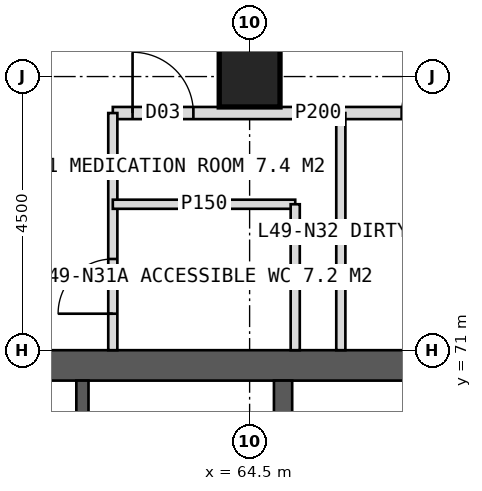
"""IFC4 building model, lengths in metres.
Left out: names, types, materials, properties, quantities, classifications, styles, units other than length and angle.
Written with IfcOpenShell. Run it as: python <this file> out.ifc"""

import sys

from ifc_helpers import new_model, si_unit, direction, frame, frame_2d, origin, origin_2d, place, context, subcontext, project, spatial, rectangle, hollow_rectangle, extrude, element, fill, save


model = new_model("IFC4")
c1 = context("Model", 3, precision=1e-05, world=origin(), true_north=direction((0.0, 1.0)))
c2 = subcontext(c1, "Body", "Model", "MODEL_VIEW")
j1 = project(units=[si_unit("LENGTHUNIT", "METRE"), si_unit("PLANEANGLEUNIT", "RADIAN")], contexts=[c1])
p1 = place(None, origin())
s1 = spatial("IfcSite", under=j1, at=p1, CompositionType="ELEMENT")
p2 = place(p1, origin())
s2 = spatial("IfcBuilding", under=s1, at=p2, CompositionType="ELEMENT")
p3 = place(p2, frame((0.0, 0.0, 205.0)))
s3 = spatial("IfcBuildingStorey", under=s2, at=p3, CompositionType="ELEMENT", Elevation=205.0)
p4 = place(p3, frame((51.0, 70.75, 0.0), z_axis=(0.0, 0.0, 1.0), x_axis=(1.0, 0.0, 0.0)))
e1 = element("IfcWall", 1, at=p4, inside=s3, PredefinedType="SHEAR", context=c2, shape_type="SweptSolid", body=[
    extrude(rectangle(XDim=18.0, YDim=0.5, at=frame_2d((9.0, 0.0))), origin(), (0.0, 0.0, 1.0), 4.0),
])
p5 = place(p4, frame((8.1, 0.0, 0.0)))
e2 = element("IfcOpeningElement", 2, at=p5, cuts=e1, PredefinedType="OPENING", context=c2, shape_type="SweptSolid", body=[
    extrude(rectangle(XDim=1.8, YDim=2.2, at=frame_2d((0.9, 1.1))), frame((0.0, 0.26, 0.0), z_axis=(0.0, -1.0, 0.0), x_axis=(1.0, 0.0, 0.0)), (0.0, 0.0, 1.0), 0.52),
])
p6 = place(p3, frame((65.05, 53.5, 0.0), z_axis=(0.0, 0.0, 1.0), x_axis=(0.0, 1.0, 0.0)))
e3 = element("IfcWall", 3, at=p6, inside=s3, PredefinedType="SHEAR", context=c2, shape_type="SweptSolid", body=[
    extrude(rectangle(XDim=17.0, YDim=0.3, at=frame_2d((8.5, 0.0))), origin(), (0.0, 0.0, 1.0), 4.0),
])
p7 = place(p3, frame((61.75, 53.5, 0.0), z_axis=(0.0, 0.0, 1.0), x_axis=(0.0, 1.0, 0.0)))
e4 = element("IfcWall", 4, at=p7, inside=s3, PredefinedType="SHEAR", context=c2, shape_type="SweptSolid", body=[
    extrude(rectangle(XDim=17.0, YDim=0.2, at=frame_2d((8.5, 0.0))), origin(), (0.0, 0.0, 1.0), 4.0),
])
p8 = place(p7, frame((0.496, 0.0, 0.0)))
e5 = element("IfcOpeningElement", 5, at=p8, cuts=e4, PredefinedType="OPENING", context=c2, shape_type="SweptSolid", body=[
    extrude(rectangle(XDim=1.0, YDim=2.1, at=frame_2d((0.5, 1.05))), frame((0.0, 0.11, 0.0), z_axis=(0.0, -1.0, 0.0), x_axis=(1.0, 0.0, 0.0)), (0.0, 0.0, 1.0), 0.22),
])
p9 = place(p7, frame((2.646, 0.0, 0.0)))
e6 = element("IfcOpeningElement", 6, at=p9, cuts=e4, PredefinedType="OPENING", context=c2, shape_type="SweptSolid", body=[
    extrude(rectangle(XDim=1.0, YDim=2.1, at=frame_2d((0.5, 1.05))), frame((0.0, 0.11, 0.0), z_axis=(0.0, -1.0, 0.0), x_axis=(1.0, 0.0, 0.0)), (0.0, 0.0, 1.0), 0.22),
])
p10 = place(p7, frame((5.027, 0.0, 0.0)))
e7 = element("IfcOpeningElement", 7, at=p10, cuts=e4, PredefinedType="OPENING", context=c2, shape_type="SweptSolid", body=[
    extrude(rectangle(XDim=1.0, YDim=2.1, at=frame_2d((0.5, 1.05))), frame((0.0, 0.11, 0.0), z_axis=(0.0, -1.0, 0.0), x_axis=(1.0, 0.0, 0.0)), (0.0, 0.0, 1.0), 0.22),
])
p11 = place(p7, frame((7.126, 0.0, 0.0)))
e8 = element("IfcOpeningElement", 8, at=p11, cuts=e4, PredefinedType="OPENING", context=c2, shape_type="SweptSolid", body=[
    extrude(rectangle(XDim=1.0, YDim=2.1, at=frame_2d((0.5, 1.05))), frame((0.0, 0.11, 0.0), z_axis=(0.0, -1.0, 0.0), x_axis=(1.0, 0.0, 0.0)), (0.0, 0.0, 1.0), 0.22),
])
p12 = place(p7, frame((10.025, 0.0, 0.0)))
e9 = element("IfcOpeningElement", 9, at=p12, cuts=e4, PredefinedType="OPENING", context=c2, shape_type="SweptSolid", body=[
    extrude(rectangle(XDim=1.4, YDim=2.2, at=frame_2d((0.7, 1.1))), frame((0.0, 0.11, 0.0), z_axis=(0.0, -1.0, 0.0), x_axis=(1.0, 0.0, 0.0)), (0.0, 0.0, 1.0), 0.22),
])
p13 = place(p7, frame((14.325, 0.0, 0.0)))
e10 = element("IfcOpeningElement", 10, at=p13, cuts=e4, PredefinedType="OPENING", context=c2, shape_type="SweptSolid", body=[
    extrude(rectangle(XDim=1.4, YDim=2.2, at=frame_2d((0.7, 1.1))), frame((0.0, 0.11, 0.0), z_axis=(0.0, -1.0, 0.0), x_axis=(1.0, 0.0, 0.0)), (0.0, 0.0, 1.0), 0.22),
])
p14 = place(p3, frame((64.5, 75.5, 0.0), z_axis=(0.0, 0.0, 1.0), x_axis=(1.0, 0.0, 0.0)))
e11 = element("IfcColumn", 11, at=p14, inside=s3, PredefinedType="COLUMN", context=c2, shape_type="SweptSolid", body=[
    extrude(hollow_rectangle(XDim=1.0, YDim=1.0, WallThickness=0.1, at=origin_2d()), origin(), (0.0, 0.0, 1.0), 4.0),
])
p15 = place(p3, frame((62.25, 74.9, 0.0), z_axis=(0.0, 0.0, 1.0), x_axis=(1.0, 0.0, 0.0)))
e12 = element("IfcWall", 12, at=p15, inside=s3, PredefinedType="PARTITIONING", context=c2, shape_type="SweptSolid", body=[
    extrude(rectangle(XDim=6.75, YDim=0.2, at=frame_2d((3.375, 0.0))), origin(), (0.0, 0.0, 1.0), 3.75),
])
p16 = place(p15, frame((0.325, 0.0, 0.0)))
e13 = element("IfcOpeningElement", 13, at=p16, cuts=e12, PredefinedType="OPENING", context=c2, shape_type="SweptSolid", body=[
    extrude(rectangle(XDim=1.0, YDim=2.1, at=frame_2d((0.5, 1.05))), frame((0.0, 0.11, 0.0), z_axis=(0.0, -1.0, 0.0), x_axis=(1.0, 0.0, 0.0)), (0.0, 0.0, 1.0), 0.22),
])
p17 = place(p15, frame((4.75, 0.0, 0.0)))
e14 = element("IfcOpeningElement", 14, at=p17, cuts=e12, PredefinedType="OPENING", context=c2, shape_type="SweptSolid", body=[
    extrude(rectangle(XDim=1.0, YDim=2.1, at=frame_2d((0.5, 1.05))), frame((0.0, 0.11, 0.0), z_axis=(0.0, -1.0, 0.0), x_axis=(1.0, 0.0, 0.0)), (0.0, 0.0, 1.0), 0.22),
])
p18 = place(p3, frame((62.25, 71.0, 0.0), z_axis=(0.0, 0.0, 1.0), x_axis=(0.0, 1.0, 0.0)))
e15 = element("IfcWall", 15, at=p18, inside=s3, PredefinedType="PARTITIONING", context=c2, shape_type="SweptSolid", body=[
    extrude(rectangle(XDim=3.9, YDim=0.15, at=frame_2d((1.95, 0.0))), origin(), (0.0, 0.0, 1.0), 3.75),
])
p19 = place(p18, frame((0.6, 0.0, 0.0)))
e16 = element("IfcOpeningElement", 16, at=p19, cuts=e15, PredefinedType="OPENING", context=c2, shape_type="SweptSolid", body=[
    extrude(rectangle(XDim=0.9, YDim=2.1, at=frame_2d((0.45, 1.05))), frame((0.0, 0.085, 0.0), z_axis=(0.0, -1.0, 0.0), x_axis=(1.0, 0.0, 0.0)), (0.0, 0.0, 1.0), 0.17),
])
p20 = place(p3, frame((66.0, 71.0, 0.0), z_axis=(0.0, 0.0, 1.0), x_axis=(0.0, 1.0, 0.0)))
e17 = element("IfcWall", 17, at=p20, inside=s3, PredefinedType="PARTITIONING", context=c2, shape_type="SweptSolid", body=[
    extrude(rectangle(XDim=3.9, YDim=0.15, at=frame_2d((1.95, 0.0))), origin(), (0.0, 0.0, 1.0), 3.75),
])
p21 = place(p3, frame((62.25, 73.4, 0.0), z_axis=(0.0, 0.0, 1.0), x_axis=(1.0, 0.0, 0.0)))
e18 = element("IfcWall", 18, at=p21, inside=s3, PredefinedType="PARTITIONING", context=c2, shape_type="SweptSolid", body=[
    extrude(rectangle(XDim=3.0, YDim=0.15, at=frame_2d((1.5, 0.0))), origin(), (0.0, 0.0, 1.0), 3.75),
])
p22 = place(p3, frame((65.25, 71.0, 0.0), z_axis=(0.0, 0.0, 1.0), x_axis=(0.0, 1.0, 0.0)))
e19 = element("IfcWall", 19, at=p22, inside=s3, PredefinedType="PARTITIONING", context=c2, shape_type="SweptSolid", body=[
    extrude(rectangle(XDim=2.4, YDim=0.15, at=frame_2d((1.2, 0.0))), origin(), (0.0, 0.0, 1.0), 3.75),
])
p23 = place(p19, origin())
e20 = element("IfcDoor", 20, at=p23, inside=s3, OperationType="SINGLE_SWING_LEFT", PredefinedType="DOOR", context=c2, shape_type="SweptSolid", body=[
    extrude(rectangle(XDim=0.9, YDim=2.1, at=frame_2d((0.45, 1.05))), frame((0.0, 0.025, 0.0), z_axis=(0.0, -1.0, 0.0), x_axis=(1.0, 0.0, 0.0)), (0.0, 0.0, 1.0), 0.05),
])
fill(e16, e20)
p24 = place(p16, origin())
e21 = element("IfcDoor", 21, at=p24, inside=s3, OperationType="SINGLE_SWING_LEFT", PredefinedType="DOOR", context=c2, shape_type="SweptSolid", body=[
    extrude(rectangle(XDim=1.0, YDim=2.1, at=frame_2d((0.5, 1.05))), frame((0.0, 0.025, 0.0), z_axis=(0.0, -1.0, 0.0), x_axis=(1.0, 0.0, 0.0)), (0.0, 0.0, 1.0), 0.05),
])
fill(e13, e21)
save(model, sys.argv[1])
